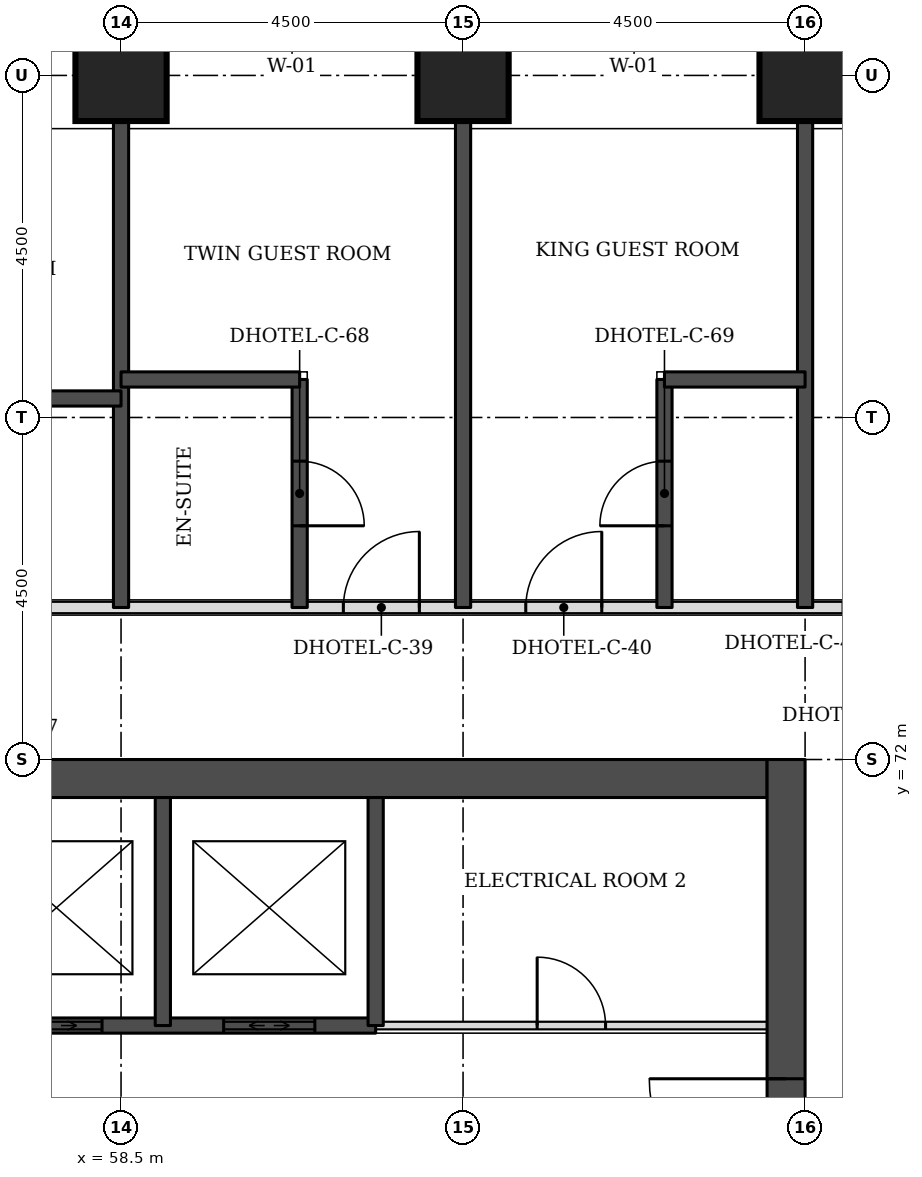
"""IFC4 building model, lengths in metres.
Left out: names, types, materials, properties, quantities, classifications, styles, units other than length and angle.
Written with IfcOpenShell. Run it as: python <this file> out.ifc"""

import sys

from ifc_helpers import new_model, si_unit, direction, frame, frame_2d, origin, origin_2d, place, context, subcontext, project, spatial, rectangle, extrude, element, fill, save


model = new_model("IFC4")
c1 = context("Model", 3, precision=1e-05, world=origin(), true_north=direction((0.0, 1.0)))
c2 = subcontext(c1, "Body", "Model", "MODEL_VIEW")
j1 = project(units=[si_unit("LENGTHUNIT", "METRE"), si_unit("PLANEANGLEUNIT", "RADIAN")], contexts=[c1])
p1 = place(None, origin())
s1 = spatial("IfcSite", under=j1, at=p1, CompositionType="ELEMENT")
p2 = place(p1, origin())
s2 = spatial("IfcBuilding", under=s1, at=p2, CompositionType="ELEMENT")
p3 = place(p2, frame((0.0, 0.0, 56.1)))
s3 = spatial("IfcBuildingStorey", under=s2, at=p3, CompositionType="ELEMENT", Elevation=56.1)
for number, where, z_axis, x_axis in (
    (1, (58.5, 81.0, 0.0), (0.0, 0.0, 1.0), (1.0, 0.0, 0.0)),
    (2, (63.0, 81.0, 0.0), (0.0, 0.0, 1.0), (1.0, 0.0, 0.0)),
    (3, (67.5, 81.0, 0.0), (0.0, 0.0, 1.0), (1.0, 0.0, 0.0)),
):
    element("IfcColumn", number, at=place(p3, frame(where, z_axis=z_axis, x_axis=x_axis)), inside=s3, PredefinedType="COLUMN", context=c2, shape_type="SweptSolid", body=[
        extrude(rectangle(XDim=1.2, YDim=1.2, at=origin_2d()), origin(), (0.0, 0.0, 1.0), 3.3),
    ])
p4 = place(p3, frame((45.5, 71.75, 0.0), z_axis=(0.0, 0.0, 1.0), x_axis=(1.0, 0.0, 0.0)))
e4 = element("IfcWall", 4, at=p4, inside=s3, PredefinedType="SHEAR", context=c2, shape_type="SweptSolid", body=[
    extrude(rectangle(XDim=21.5, YDim=0.5, at=frame_2d((10.75, 0.0))), origin(), (0.0, 0.0, 1.0), 3.3),
])
p5 = place(p3, frame((67.25, 49.5, 0.0), z_axis=(0.0, 0.0, 1.0), x_axis=(0.0, 1.0, 0.0)))
e5 = element("IfcWall", 5, at=p5, inside=s3, PredefinedType="SHEAR", context=c2, shape_type="SweptSolid", body=[
    extrude(rectangle(XDim=22.5, YDim=0.5, at=frame_2d((11.25, 0.0))), origin(), (0.0, 0.0, 1.0), 3.3),
])
p6 = place(p5, frame((4.2, 0.0, 0.0)))
e6 = element("IfcOpeningElement", 6, at=p6, cuts=e5, PredefinedType="OPENING", context=c2, shape_type="SweptSolid", body=[
    extrude(rectangle(XDim=1.8, YDim=2.1, at=frame_2d((0.9, 1.05))), frame((0.0, 0.26, 0.0), z_axis=(0.0, -1.0, 0.0), x_axis=(1.0, 0.0, 0.0)), (0.0, 0.0, 1.0), 0.52),
])
p7 = place(p5, frame((6.9, 0.0, 0.0)))
e7 = element("IfcOpeningElement", 7, at=p7, cuts=e5, PredefinedType="OPENING", context=c2, shape_type="SweptSolid", body=[
    extrude(rectangle(XDim=1.1, YDim=2.1, at=frame_2d((0.55, 1.05))), frame((0.0, 0.26, 0.0), z_axis=(0.0, -1.0, 0.0), x_axis=(1.0, 0.0, 0.0)), (0.0, 0.0, 1.0), 0.52),
])
p8 = place(p5, frame((13.6, 0.0, 0.0)))
e8 = element("IfcOpeningElement", 8, at=p8, cuts=e5, PredefinedType="OPENING", context=c2, shape_type="SweptSolid", body=[
    extrude(rectangle(XDim=1.1, YDim=2.1, at=frame_2d((0.55, 1.05))), frame((0.0, 0.26, 0.0), z_axis=(0.0, -1.0, 0.0), x_axis=(1.0, 0.0, 0.0)), (0.0, 0.0, 1.0), 0.52),
])
p9 = place(p5, frame((16.5, 0.0, 0.0)))
e9 = element("IfcOpeningElement", 9, at=p9, cuts=e5, PredefinedType="OPENING", context=c2, shape_type="SweptSolid", body=[
    extrude(rectangle(XDim=1.8, YDim=2.1, at=frame_2d((0.9, 1.05))), frame((0.0, 0.26, 0.0), z_axis=(0.0, -1.0, 0.0), x_axis=(1.0, 0.0, 0.0)), (0.0, 0.0, 1.0), 0.52),
])
p10 = place(p3, frame((43.0, 74.0, 0.0), z_axis=(0.0, 0.0, 1.0), x_axis=(1.0, 0.0, 0.0)))
e10 = element("IfcWall", 10, at=p10, inside=s3, PredefinedType="PARTITIONING", context=c2, shape_type="SweptSolid", body=[
    extrude(rectangle(XDim=26.5, YDim=0.15, at=frame_2d((13.25, 0.0))), origin(), (0.0, 0.0, 1.0), 3.08),
])
p11 = place(p10, frame((2.825, 0.0, 0.0)))
e11 = element("IfcOpeningElement", 11, at=p11, cuts=e10, PredefinedType="OPENING", context=c2, shape_type="SweptSolid", body=[
    extrude(rectangle(XDim=1.0, YDim=2.1, at=frame_2d((0.5, 1.05))), frame((0.0, 0.085, 0.0), z_axis=(0.0, -1.0, 0.0), x_axis=(1.0, 0.0, 0.0)), (0.0, 0.0, 1.0), 0.17),
])
p12 = place(p10, frame((9.425, 0.0, 0.0)))
e12 = element("IfcOpeningElement", 12, at=p12, cuts=e10, PredefinedType="OPENING", context=c2, shape_type="SweptSolid", body=[
    extrude(rectangle(XDim=1.0, YDim=2.1, at=frame_2d((0.5, 1.05))), frame((0.0, 0.085, 0.0), z_axis=(0.0, -1.0, 0.0), x_axis=(1.0, 0.0, 0.0)), (0.0, 0.0, 1.0), 0.17),
])
p13 = place(p10, frame((11.825, 0.0, 0.0)))
e13 = element("IfcOpeningElement", 13, at=p13, cuts=e10, PredefinedType="OPENING", context=c2, shape_type="SweptSolid", body=[
    extrude(rectangle(XDim=1.0, YDim=2.1, at=frame_2d((0.5, 1.05))), frame((0.0, 0.085, 0.0), z_axis=(0.0, -1.0, 0.0), x_axis=(1.0, 0.0, 0.0)), (0.0, 0.0, 1.0), 0.17),
])
p14 = place(p10, frame((18.425, 0.0, 0.0)))
e14 = element("IfcOpeningElement", 14, at=p14, cuts=e10, PredefinedType="OPENING", context=c2, shape_type="SweptSolid", body=[
    extrude(rectangle(XDim=1.0, YDim=2.1, at=frame_2d((0.5, 1.05))), frame((0.0, 0.085, 0.0), z_axis=(0.0, -1.0, 0.0), x_axis=(1.0, 0.0, 0.0)), (0.0, 0.0, 1.0), 0.17),
])
p15 = place(p10, frame((20.825, 0.0, 0.0)))
e15 = element("IfcOpeningElement", 15, at=p15, cuts=e10, PredefinedType="OPENING", context=c2, shape_type="SweptSolid", body=[
    extrude(rectangle(XDim=1.0, YDim=2.1, at=frame_2d((0.5, 1.05))), frame((0.0, 0.085, 0.0), z_axis=(0.0, -1.0, 0.0), x_axis=(1.0, 0.0, 0.0)), (0.0, 0.0, 1.0), 0.17),
])
p16 = place(p10, frame((0.5, 0.0, 0.0)))
e16 = element("IfcOpeningElement", 16, at=p16, cuts=e10, PredefinedType="OPENING", context=c2, shape_type="SweptSolid", body=[
    extrude(rectangle(XDim=1.0, YDim=2.1, at=frame_2d((0.5, 1.05))), frame((0.0, 0.085, 0.0), z_axis=(0.0, -1.0, 0.0), x_axis=(1.0, 0.0, 0.0)), (0.0, 0.0, 1.0), 0.17),
])
p17 = place(p10, frame((25.0, 0.0, 0.0)))
e17 = element("IfcOpeningElement", 17, at=p17, cuts=e10, PredefinedType="OPENING", context=c2, shape_type="SweptSolid", body=[
    extrude(rectangle(XDim=1.0, YDim=2.1, at=frame_2d((0.5, 1.05))), frame((0.0, 0.085, 0.0), z_axis=(0.0, -1.0, 0.0), x_axis=(1.0, 0.0, 0.0)), (0.0, 0.0, 1.0), 0.17),
])
p18 = place(p3, frame((58.5, 74.0, 0.0), z_axis=(0.0, 0.0, 1.0), x_axis=(0.0, 1.0, 0.0)))
e18 = element("IfcWall", 18, at=p18, inside=s3, PredefinedType="SOLIDWALL", context=c2, shape_type="SweptSolid", body=[
    extrude(rectangle(XDim=6.4, YDim=0.2, at=frame_2d((3.2, 0.0))), origin(), (0.0, 0.0, 1.0), 3.08),
])
p19 = place(p3, frame((60.85, 74.0, 0.0), z_axis=(0.0, 0.0, 1.0), x_axis=(0.0, 1.0, 0.0)))
e19 = element("IfcWall", 19, at=p19, inside=s3, PredefinedType="SOLIDWALL", context=c2, shape_type="SweptSolid", body=[
    extrude(rectangle(XDim=3.0, YDim=0.2, at=frame_2d((1.5, 0.0))), origin(), (0.0, 0.0, 1.0), 3.08),
])
p20 = place(p19, frame((1.075, 0.0, 0.0)))
e20 = element("IfcOpeningElement", 20, at=p20, cuts=e19, PredefinedType="OPENING", context=c2, shape_type="SweptSolid", body=[
    extrude(rectangle(XDim=0.85, YDim=2.1, at=frame_2d((0.425, 1.05))), frame((0.0, 0.11, 0.0), z_axis=(0.0, -1.0, 0.0), x_axis=(1.0, 0.0, 0.0)), (0.0, 0.0, 1.0), 0.22),
])
p21 = place(p3, frame((63.0, 74.0, 0.0), z_axis=(0.0, 0.0, 1.0), x_axis=(0.0, 1.0, 0.0)))
e21 = element("IfcWall", 21, at=p21, inside=s3, PredefinedType="SOLIDWALL", context=c2, shape_type="SweptSolid", body=[
    extrude(rectangle(XDim=6.4, YDim=0.2, at=frame_2d((3.2, 0.0))), origin(), (0.0, 0.0, 1.0), 3.08),
])
p22 = place(p3, frame((65.65, 74.0, 0.0), z_axis=(0.0, 0.0, 1.0), x_axis=(0.0, 1.0, 0.0)))
e22 = element("IfcWall", 22, at=p22, inside=s3, PredefinedType="SOLIDWALL", context=c2, shape_type="SweptSolid", body=[
    extrude(rectangle(XDim=3.0, YDim=0.2, at=frame_2d((1.5, 0.0))), origin(), (0.0, 0.0, 1.0), 3.08),
])
p23 = place(p22, frame((1.075, 0.0, 0.0)))
e23 = element("IfcOpeningElement", 23, at=p23, cuts=e22, PredefinedType="OPENING", context=c2, shape_type="SweptSolid", body=[
    extrude(rectangle(XDim=0.85, YDim=2.1, at=frame_2d((0.425, 1.05))), frame((0.0, 0.11, 0.0), z_axis=(0.0, -1.0, 0.0), x_axis=(1.0, 0.0, 0.0)), (0.0, 0.0, 1.0), 0.22),
])
p24 = place(p3, frame((67.5, 74.0, 0.0), z_axis=(0.0, 0.0, 1.0), x_axis=(0.0, 1.0, 0.0)))
e24 = element("IfcWall", 24, at=p24, inside=s3, PredefinedType="SOLIDWALL", context=c2, shape_type="SweptSolid", body=[
    extrude(rectangle(XDim=6.4, YDim=0.2, at=frame_2d((3.2, 0.0))), origin(), (0.0, 0.0, 1.0), 3.08),
])
p25 = place(p3, frame((56.65, 76.75, 0.0), z_axis=(0.0, 0.0, 1.0), x_axis=(1.0, 0.0, 0.0)))
e25 = element("IfcWall", 25, at=p25, inside=s3, PredefinedType="SOLIDWALL", context=c2, shape_type="SweptSolid", body=[
    extrude(rectangle(XDim=1.85, YDim=0.2, at=frame_2d((0.925, 0.0))), origin(), (0.0, 0.0, 1.0), 3.08),
])
p26 = place(p3, frame((58.5, 77.0, 0.0), z_axis=(0.0, 0.0, 1.0), x_axis=(1.0, 0.0, 0.0)))
e26 = element("IfcWall", 26, at=p26, inside=s3, PredefinedType="SOLIDWALL", context=c2, shape_type="SweptSolid", body=[
    extrude(rectangle(XDim=2.35, YDim=0.2, at=frame_2d((1.175, 0.0))), origin(), (0.0, 0.0, 1.0), 3.08),
])
p27 = place(p3, frame((65.65, 77.0, 0.0), z_axis=(0.0, 0.0, 1.0), x_axis=(1.0, 0.0, 0.0)))
e27 = element("IfcWall", 27, at=p27, inside=s3, PredefinedType="SOLIDWALL", context=c2, shape_type="SweptSolid", body=[
    extrude(rectangle(XDim=1.85, YDim=0.2, at=frame_2d((0.925, 0.0))), origin(), (0.0, 0.0, 1.0), 3.08),
])
p28 = place(p3, frame((61.85, 68.5, 0.0), z_axis=(0.0, 0.0, 1.0), x_axis=(1.0, 0.0, 0.0)))
e28 = element("IfcWall", 28, at=p28, inside=s3, PredefinedType="PARTITIONING", context=c2, shape_type="SweptSolid", body=[
    extrude(rectangle(XDim=5.15, YDim=0.1, at=frame_2d((2.575, 0.0))), origin(), (0.0, 0.0, 1.0), 3.08),
])
p29 = place(p28, frame((2.125, 0.0, 0.0)))
e29 = element("IfcOpeningElement", 29, at=p29, cuts=e28, PredefinedType="OPENING", context=c2, shape_type="SweptSolid", body=[
    extrude(rectangle(XDim=0.9, YDim=2.1, at=frame_2d((0.45, 1.05))), frame((0.0, 0.06, 0.0), z_axis=(0.0, -1.0, 0.0), x_axis=(1.0, 0.0, 0.0)), (0.0, 0.0, 1.0), 0.12),
])
p30 = place(p3, frame((50.65, 68.5, 0.0), z_axis=(0.0, 0.0, 1.0), x_axis=(1.0, 0.0, 0.0)))
e30 = element("IfcWall", 30, at=p30, inside=s3, PredefinedType="SOLIDWALL", context=c2, shape_type="SweptSolid", body=[
    extrude(rectangle(XDim=11.2, YDim=0.2, at=frame_2d((5.6, 0.0))), origin(), (0.0, 0.0, 1.0), 3.08),
])
p31 = place(p30, frame((0.8, 0.0, 0.0)))
e31 = element("IfcOpeningElement", 31, at=p31, cuts=e30, PredefinedType="OPENING", context=c2, shape_type="SweptSolid", body=[
    extrude(rectangle(XDim=1.2, YDim=2.1, at=frame_2d((0.6, 1.05))), frame((0.0, 0.11, 0.0), z_axis=(0.0, -1.0, 0.0), x_axis=(1.0, 0.0, 0.0)), (0.0, 0.0, 1.0), 0.22),
])
p32 = place(p30, frame((3.6, 0.0, 0.0)))
e32 = element("IfcOpeningElement", 32, at=p32, cuts=e30, PredefinedType="OPENING", context=c2, shape_type="SweptSolid", body=[
    extrude(rectangle(XDim=1.2, YDim=2.1, at=frame_2d((0.6, 1.05))), frame((0.0, 0.11, 0.0), z_axis=(0.0, -1.0, 0.0), x_axis=(1.0, 0.0, 0.0)), (0.0, 0.0, 1.0), 0.22),
])
p33 = place(p30, frame((6.4, 0.0, 0.0)))
e33 = element("IfcOpeningElement", 33, at=p33, cuts=e30, PredefinedType="OPENING", context=c2, shape_type="SweptSolid", body=[
    extrude(rectangle(XDim=1.2, YDim=2.1, at=frame_2d((0.6, 1.05))), frame((0.0, 0.11, 0.0), z_axis=(0.0, -1.0, 0.0), x_axis=(1.0, 0.0, 0.0)), (0.0, 0.0, 1.0), 0.22),
])
p34 = place(p30, frame((9.2, 0.0, 0.0)))
e34 = element("IfcOpeningElement", 34, at=p34, cuts=e30, PredefinedType="OPENING", context=c2, shape_type="SweptSolid", body=[
    extrude(rectangle(XDim=1.2, YDim=2.1, at=frame_2d((0.6, 1.05))), frame((0.0, 0.11, 0.0), z_axis=(0.0, -1.0, 0.0), x_axis=(1.0, 0.0, 0.0)), (0.0, 0.0, 1.0), 0.22),
])
for number, where, z_axis, x_axis in (
    (35, (59.05, 68.5, 0.0), (0.0, 0.0, 1.0), (0.0, 1.0, 0.0)),
    (36, (61.85, 68.5, 0.0), (0.0, 0.0, 1.0), (0.0, 1.0, 0.0)),
):
    element("IfcWall", number, at=place(p3, frame(where, z_axis=z_axis, x_axis=x_axis)), inside=s3, PredefinedType="SOLIDWALL", context=c2, shape_type="SweptSolid", body=[
        extrude(rectangle(XDim=3.0, YDim=0.2, at=frame_2d((1.5, 0.0))), origin(), (0.0, 0.0, 1.0), 3.08),
    ])
p35 = place(p14, origin())
e37 = element("IfcDoor", 37, at=p35, inside=s3, OperationType="SINGLE_SWING_RIGHT", PredefinedType="DOOR", context=c2, shape_type="SweptSolid", body=[
    extrude(rectangle(XDim=1.0, YDim=2.1, at=frame_2d((0.5, 1.05))), frame((0.0, 0.025, 0.0), z_axis=(0.0, -1.0, 0.0), x_axis=(1.0, 0.0, 0.0)), (0.0, 0.0, 1.0), 0.05),
])
fill(e14, e37)
p36 = place(p20, frame((0.85, 0.0, 0.0), z_axis=(0.0, 0.0, 1.0), x_axis=(-1.0, 0.0, 0.0)))
e38 = element("IfcDoor", 38, at=p36, inside=s3, OperationType="SINGLE_SWING_RIGHT", PredefinedType="DOOR", context=c2, shape_type="SweptSolid", body=[
    extrude(rectangle(XDim=0.85, YDim=2.1, at=frame_2d((0.425, 1.05))), frame((0.0, 0.025, 0.0), z_axis=(0.0, -1.0, 0.0), x_axis=(1.0, 0.0, 0.0)), (0.0, 0.0, 1.0), 0.05),
])
fill(e20, e38)
p37 = place(p15, origin())
e39 = element("IfcDoor", 39, at=p37, inside=s3, OperationType="SINGLE_SWING_RIGHT", PredefinedType="DOOR", context=c2, shape_type="SweptSolid", body=[
    extrude(rectangle(XDim=1.0, YDim=2.1, at=frame_2d((0.5, 1.05))), frame((0.0, 0.025, 0.0), z_axis=(0.0, -1.0, 0.0), x_axis=(1.0, 0.0, 0.0)), (0.0, 0.0, 1.0), 0.05),
])
fill(e15, e39)
p38 = place(p23, origin())
e40 = element("IfcDoor", 40, at=p38, inside=s3, OperationType="SINGLE_SWING_LEFT", PredefinedType="DOOR", context=c2, shape_type="SweptSolid", body=[
    extrude(rectangle(XDim=0.85, YDim=2.1, at=frame_2d((0.425, 1.05))), frame((0.0, 0.025, 0.0), z_axis=(0.0, -1.0, 0.0), x_axis=(1.0, 0.0, 0.0)), (0.0, 0.0, 1.0), 0.05),
])
fill(e23, e40)
p39 = place(p33, origin())
e41 = element("IfcDoor", 41, at=p39, inside=s3, OperationType="DOUBLE_DOOR_SLIDING", PredefinedType="DOOR", context=c2, shape_type="SweptSolid", body=[
    extrude(rectangle(XDim=1.2, YDim=2.1, at=frame_2d((0.6, 1.05))), frame((0.0, 0.025, 0.0), z_axis=(0.0, -1.0, 0.0), x_axis=(1.0, 0.0, 0.0)), (0.0, 0.0, 1.0), 0.05),
])
fill(e33, e41)
p40 = place(p34, origin())
e42 = element("IfcDoor", 42, at=p40, inside=s3, OperationType="DOUBLE_DOOR_SLIDING", PredefinedType="DOOR", context=c2, shape_type="SweptSolid", body=[
    extrude(rectangle(XDim=1.2, YDim=2.1, at=frame_2d((0.6, 1.05))), frame((0.0, 0.025, 0.0), z_axis=(0.0, -1.0, 0.0), x_axis=(1.0, 0.0, 0.0)), (0.0, 0.0, 1.0), 0.05),
])
fill(e34, e42)
p41 = place(p9, origin())
e43 = element("IfcDoor", 43, at=p41, inside=s3, OperationType="SINGLE_SWING_RIGHT", PredefinedType="DOOR", context=c2, shape_type="SweptSolid", body=[
    extrude(rectangle(XDim=1.8, YDim=2.1, at=frame_2d((0.9, 1.05))), frame((0.0, 0.025, 0.0), z_axis=(0.0, -1.0, 0.0), x_axis=(1.0, 0.0, 0.0)), (0.0, 0.0, 1.0), 0.05),
])
fill(e9, e43)
p42 = place(p29, origin())
e44 = element("IfcDoor", 44, at=p42, inside=s3, OperationType="SINGLE_SWING_LEFT", PredefinedType="DOOR", context=c2, shape_type="SweptSolid", body=[
    extrude(rectangle(XDim=0.9, YDim=2.1, at=frame_2d((0.45, 1.05))), frame((0.0, 0.025, 0.0), z_axis=(0.0, -1.0, 0.0), x_axis=(1.0, 0.0, 0.0)), (0.0, 0.0, 1.0), 0.05),
])
fill(e29, e44)
save(model, sys.argv[1])
